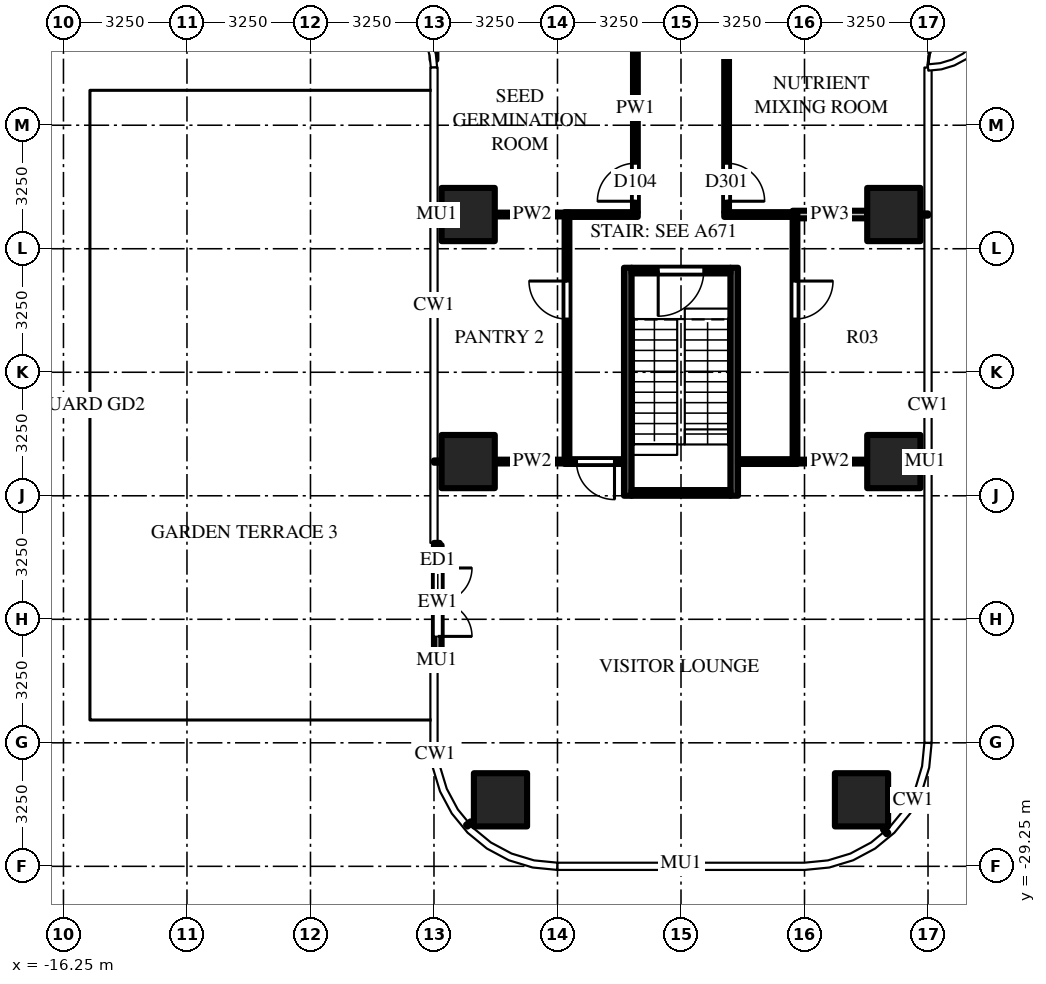
"""IFC4 building model, lengths in metres.
Left out: names, types, materials, properties, quantities, classifications, styles, units other than length and angle.
Written with IfcOpenShell. Run it as: python <this file> out.ifc"""

import sys

from ifc_helpers import new_model, si_unit, direction, frame, frame_2d, origin, origin_2d, place, context, subcontext, project, spatial, rectangle, extrude, source, transform, mapped, element, fill, save


model = new_model("IFC4")
c1 = context("Model", 3, precision=1e-05, world=origin(), true_north=direction((0.0, 1.0)))
c2 = subcontext(c1, "Body", "Model", "MODEL_VIEW")
j1 = project(units=[si_unit("LENGTHUNIT", "METRE"), si_unit("PLANEANGLEUNIT", "RADIAN")], contexts=[c1])
p1 = place(None, origin())
s1 = spatial("IfcSite", under=j1, at=p1, CompositionType="ELEMENT")
p2 = place(p1, origin())
s2 = spatial("IfcBuilding", under=s1, at=p2, CompositionType="ELEMENT")
p3 = place(p2, frame((0.0, 0.0, 34.0)))
s3 = spatial("IfcBuildingStorey", under=s2, at=p3, CompositionType="ELEMENT", Elevation=34.0)
m1 = source(origin(), c2, "Body", "SweptSolid", [
    extrude(rectangle(XDim=1.4, YDim=1.4, at=origin_2d()), origin(), (0.0, 0.0, 1.0), 4.5),
])
for number, where, z_axis, x_axis in (
    (1, (5.6, -12.1, 0.0), (0.0, 0.0, 1.0), (1.0, 0.0, 0.0)),
    (2, (5.6, -18.6, 0.0), (0.0, 0.0, 1.0), (1.0, 0.0, 0.0)),
    (3, (4.75, -27.5, 0.0), (0.0, 0.0, 1.0), (1.0, 0.0, 0.0)),
    (4, (-5.6, -12.1, 0.0), (0.0, 0.0, 1.0), (1.0, 0.0, 0.0)),
    (5, (-5.6, -18.6, 0.0), (0.0, 0.0, 1.0), (1.0, 0.0, 0.0)),
    (6, (-4.75, -27.5, 0.0), (0.0, 0.0, 1.0), (1.0, 0.0, 0.0)),
):
    element("IfcColumn", number, at=place(p3, frame(where, z_axis=z_axis, x_axis=x_axis)), inside=s3, PredefinedType="COLUMN", context=c2, shape_type="MappedRepresentation", body=[
        mapped(m1, transform((0.0, 0.0, 0.0))),
    ])
m2 = source(origin(), c2, "Body", "SweptSolid", [
    extrude(rectangle(XDim=6.0, YDim=0.2, at=frame_2d((3.0, 0.0))), origin(), (0.0, 0.0, 1.0), 4.25),
])
for number, where, z_axis, x_axis in (
    (7, (1.4, -13.5, 0.0), (0.0, 0.0, 1.0), (0.0, -1.0, 0.0)),
    (8, (-1.4, -13.5, 0.0), (0.0, 0.0, 1.0), (0.0, -1.0, 0.0)),
):
    element("IfcWall", number, at=place(p3, frame(where, z_axis=z_axis, x_axis=x_axis)), inside=s3, PredefinedType="SHEAR", context=c2, shape_type="MappedRepresentation", body=[
        mapped(m2, transform((0.0, 0.0, 0.0))),
    ])
m3 = source(origin(), c2, "Body", "SweptSolid", [
    extrude(rectangle(XDim=2.6, YDim=0.15, at=frame_2d((1.3, 0.0))), origin(), (0.0, 0.0, 1.0), 4.25),
])
p4 = place(p3, frame((1.3, -13.575, 0.0), z_axis=(0.0, 0.0, 1.0), x_axis=(-1.0, 0.0, 0.0)))
e9 = element("IfcWall", 9, at=p4, inside=s3, PredefinedType="SHEAR", context=c2, shape_type="MappedRepresentation", body=[
    mapped(m3, transform((0.0, 0.0, 0.0))),
])
m4 = source(origin(), c2, "Body", "SweptSolid", [
    extrude(rectangle(XDim=1.2, YDim=2.1, at=frame_2d((0.6, 1.05))), frame((0.0, 0.085, 0.0), z_axis=(0.0, -1.0, 0.0), x_axis=(1.0, 0.0, 0.0)), (0.0, 0.0, 1.0), 0.17),
])
p5 = place(p4, frame((0.7, 0.0, 0.0)))
e10 = element("IfcOpeningElement", 10, at=p5, cuts=e9, PredefinedType="OPENING", context=c2, shape_type="MappedRepresentation", body=[
    mapped(m4, transform((0.0, 0.0, 0.0))),
])
p6 = place(p3, frame((1.3, -19.425, 0.0), z_axis=(0.0, 0.0, 1.0), x_axis=(-1.0, 0.0, 0.0)))
e11 = element("IfcWall", 11, at=p6, inside=s3, PredefinedType="SHEAR", context=c2, shape_type="MappedRepresentation", body=[
    mapped(m3, transform((0.0, 0.0, 0.0))),
])
m5 = source(origin(), c2, "Body", "SweptSolid", [
    extrude(rectangle(XDim=3.0, YDim=0.2, at=frame_2d((1.5, 0.0))), origin(), (0.0, 0.0, 1.0), 4.25),
])
p7 = place(p3, frame((-6.4, -20.8, 0.0), z_axis=(0.0, 0.0, 1.0), x_axis=(0.0, -1.0, 0.0)))
e12 = element("IfcWall", 12, at=p7, inside=s3, PredefinedType="SOLIDWALL", context=c2, shape_type="MappedRepresentation", body=[
    mapped(m5, transform((0.0, 0.0, 0.0))),
])
m6 = source(origin(), c2, "Body", "SweptSolid", [
    extrude(rectangle(XDim=1.8, YDim=2.4, at=frame_2d((0.9, 1.2))), frame((0.0, 0.11, 0.0), z_axis=(0.0, -1.0, 0.0), x_axis=(1.0, 0.0, 0.0)), (0.0, 0.0, 1.0), 0.22),
])
p8 = place(p7, frame((0.6, 0.0, 0.0)))
e13 = element("IfcOpeningElement", 13, at=p8, cuts=e12, PredefinedType="OPENING", context=c2, shape_type="MappedRepresentation", body=[
    mapped(m6, transform((0.0, 0.0, 0.0))),
])
m7 = source(origin(), c2, "Body", "SweptSolid", [
    extrude(rectangle(XDim=1.469, YDim=0.125, at=frame_2d((0.734, 0.0))), origin(), (0.0, 0.0, 1.0), 4.25),
])
p9 = place(p3, frame((-6.5, -6.562, 0.0), z_axis=(0.0, 0.0, 1.0), x_axis=(0.0, -1.0, 0.0)))
e14 = element("IfcWall", 14, at=p9, inside=s3, PredefinedType="PARTITIONING", context=c2, shape_type="MappedRepresentation", body=[
    mapped(m7, transform((0.0, 0.0, 0.0))),
])
m8 = source(origin(), c2, "Body", "SweptSolid", [
    extrude(rectangle(XDim=6.4, YDim=0.125, at=frame_2d((3.2, 0.0))), origin(), (0.0, 0.0, 1.0), 3.468),
])
p10 = place(p3, frame((-3.0, -18.55, 0.0), z_axis=(0.0, 0.0, 1.0), x_axis=(0.0, 1.0, 0.0)))
e15 = element("IfcWall", 15, at=p10, inside=s3, PredefinedType="PARTITIONING", context=c2, shape_type="MappedRepresentation", body=[
    mapped(m8, transform((0.0, 0.0, 0.0))),
])
m9 = source(origin(), c2, "Body", "SweptSolid", [
    extrude(rectangle(XDim=1.0, YDim=2.1, at=frame_2d((0.5, 1.05))), frame((0.0, 0.073, 0.0), z_axis=(0.0, -1.0, 0.0), x_axis=(1.0, 0.0, 0.0)), (0.0, 0.0, 1.0), 0.145),
])
p11 = place(p10, frame((3.7, 0.0, 0.0)))
e16 = element("IfcOpeningElement", 16, at=p11, cuts=e15, PredefinedType="OPENING", context=c2, shape_type="MappedRepresentation", body=[
    mapped(m9, transform((0.0, 0.0, 0.0))),
])
m10 = source(origin(), c2, "Body", "SweptSolid", [
    extrude(rectangle(XDim=5.475, YDim=0.125, at=frame_2d((2.738, 0.0))), origin(), (0.0, 0.0, 1.0), 3.468),
])
p12 = place(p3, frame((-1.2, -12.038, 0.0), z_axis=(0.0, 0.0, 1.0), x_axis=(0.0, 1.0, 0.0)))
e17 = element("IfcWall", 17, at=p12, inside=s3, PredefinedType="PARTITIONING", context=c2, shape_type="MappedRepresentation", body=[
    mapped(m10, transform((0.0, 0.0, 0.0))),
])
p13 = place(p12, frame((0.288, 0.0, 0.0)))
e18 = element("IfcOpeningElement", 18, at=p13, cuts=e17, PredefinedType="OPENING", context=c2, shape_type="MappedRepresentation", body=[
    mapped(m9, transform((0.0, 0.0, 0.0))),
])
m11 = source(origin(), c2, "Body", "SweptSolid", [
    extrude(rectangle(XDim=8.725, YDim=0.125, at=frame_2d((4.363, 0.0))), origin(), (0.0, 0.0, 1.0), 3.468),
])
p14 = place(p3, frame((1.2, -3.312, 0.0), z_axis=(0.0, 0.0, 1.0), x_axis=(0.0, -1.0, 0.0)))
e19 = element("IfcWall", 19, at=p14, inside=s3, PredefinedType="PARTITIONING", context=c2, shape_type="MappedRepresentation", body=[
    mapped(m11, transform((0.0, 0.0, 0.0))),
])
p15 = place(p14, frame((7.438, 0.0, 0.0)))
e20 = element("IfcOpeningElement", 20, at=p15, cuts=e19, PredefinedType="OPENING", context=c2, shape_type="MappedRepresentation", body=[
    mapped(m9, transform((0.0, 0.0, 0.0))),
])
m12 = source(origin(), c2, "Body", "SweptSolid", [
    extrude(rectangle(XDim=6.35, YDim=0.125, at=frame_2d((3.175, 0.0))), origin(), (0.0, 0.0, 1.0), 3.468),
])
p16 = place(p3, frame((3.0, -12.2, 0.0), z_axis=(0.0, 0.0, 1.0), x_axis=(0.0, -1.0, 0.0)))
e21 = element("IfcWall", 21, at=p16, inside=s3, PredefinedType="PARTITIONING", context=c2, shape_type="MappedRepresentation", body=[
    mapped(m12, transform((0.0, 0.0, 0.0))),
])
p17 = place(p16, frame((1.65, 0.0, 0.0)))
e22 = element("IfcOpeningElement", 22, at=p17, cuts=e21, PredefinedType="OPENING", context=c2, shape_type="MappedRepresentation", body=[
    mapped(m9, transform((0.0, 0.0, 0.0))),
])
m13 = source(origin(), c2, "Body", "SweptSolid", [
    extrude(rectangle(XDim=1.962, YDim=0.1, at=frame_2d((0.981, 0.0))), origin(), (0.0, 0.0, 1.0), 3.697),
])
for number, where, z_axis, x_axis in (
    (23, (-4.9, -18.6, 0.0), (0.0, 0.0, 1.0), (1.0, 0.0, 0.0)),
    (24, (2.938, -18.6, 0.0), (0.0, 0.0, 1.0), (1.0, 0.0, 0.0)),
):
    element("IfcWall", number, at=place(p3, frame(where, z_axis=z_axis, x_axis=x_axis)), inside=s3, PredefinedType="PARTITIONING", context=c2, shape_type="MappedRepresentation", body=[
        mapped(m13, transform((0.0, 0.0, 0.0))),
    ])
m14 = source(origin(), c2, "Body", "SweptSolid", [
    extrude(rectangle(XDim=1.562, YDim=0.125, at=frame_2d((0.781, 0.0))), origin(), (0.0, 0.0, 1.0), 3.697),
])
p18 = place(p3, frame((-1.5, -18.6, 0.0), z_axis=(0.0, 0.0, 1.0), x_axis=(-1.0, 0.0, 0.0)))
e25 = element("IfcWall", 25, at=p18, inside=s3, PredefinedType="PARTITIONING", context=c2, shape_type="MappedRepresentation", body=[
    mapped(m14, transform((0.0, 0.0, 0.0))),
])
p19 = place(p18, frame((0.25, 0.0, 0.0)))
e26 = element("IfcOpeningElement", 26, at=p19, cuts=e25, PredefinedType="OPENING", context=c2, shape_type="MappedRepresentation", body=[
    mapped(m9, transform((0.0, 0.0, 0.0))),
])
p20 = place(p3, frame((3.062, -18.6, 0.0), z_axis=(0.0, 0.0, 1.0), x_axis=(-1.0, 0.0, 0.0)))
e27 = element("IfcWall", 27, at=p20, inside=s3, PredefinedType="PARTITIONING", context=c2, shape_type="MappedRepresentation", body=[
    mapped(m14, transform((0.0, 0.0, 0.0))),
])
m15 = source(origin(), c2, "Body", "SweptSolid", [
    extrude(rectangle(XDim=1.962, YDim=0.2, at=frame_2d((0.981, 0.0))), origin(), (0.0, 0.0, 1.0), 3.468),
])
p21 = place(p3, frame((2.938, -12.1, 0.0), z_axis=(0.0, 0.0, 1.0), x_axis=(1.0, 0.0, 0.0)))
e28 = element("IfcWall", 28, at=p21, inside=s3, PredefinedType="PARTITIONING", context=c2, shape_type="MappedRepresentation", body=[
    mapped(m15, transform((0.0, 0.0, 0.0))),
])
m16 = source(origin(), c2, "Body", "SweptSolid", [
    extrude(rectangle(XDim=1.962, YDim=0.1, at=frame_2d((0.981, 0.0))), origin(), (0.0, 0.0, 1.0), 3.468),
])
p22 = place(p3, frame((-4.9, -12.1, 0.0), z_axis=(0.0, 0.0, 1.0), x_axis=(1.0, 0.0, 0.0)))
e29 = element("IfcWall", 29, at=p22, inside=s3, PredefinedType="PARTITIONING", context=c2, shape_type="MappedRepresentation", body=[
    mapped(m16, transform((0.0, 0.0, 0.0))),
])
m17 = source(origin(), c2, "Body", "SweptSolid", [
    extrude(rectangle(XDim=1.925, YDim=0.125, at=frame_2d((0.962, 0.0))), origin(), (0.0, 0.0, 1.0), 3.468),
])
for number, where, z_axis, x_axis in (
    (30, (-3.062, -12.1, 0.0), (0.0, 0.0, 1.0), (1.0, 0.0, 0.0)),
    (31, (1.137, -12.1, 0.0), (0.0, 0.0, 1.0), (1.0, 0.0, 0.0)),
):
    element("IfcWall", number, at=place(p3, frame(where, z_axis=z_axis, x_axis=x_axis)), inside=s3, PredefinedType="PARTITIONING", context=c2, shape_type="MappedRepresentation", body=[
        mapped(m17, transform((0.0, 0.0, 0.0))),
    ])
m18 = source(origin(), c2, "Body", "SweptSolid", [
    extrude(rectangle(XDim=1.2, YDim=2.1, at=frame_2d((0.6, 1.05))), frame((0.0, 0.025, 0.0), z_axis=(0.0, -1.0, 0.0), x_axis=(1.0, 0.0, 0.0)), (0.0, 0.0, 1.0), 0.05),
])
p23 = place(p5, origin())
e32 = element("IfcDoor", 32, at=p23, inside=s3, OperationType="SINGLE_SWING_RIGHT", PredefinedType="DOOR", context=c2, shape_type="MappedRepresentation", body=[
    mapped(m18, transform((0.0, 0.0, 0.0))),
])
fill(e10, e32)
m19 = source(origin(), c2, "Body", "SweptSolid", [
    extrude(rectangle(XDim=1.8, YDim=2.4, at=frame_2d((0.9, 1.2))), frame((0.0, 0.025, 0.0), z_axis=(0.0, -1.0, 0.0), x_axis=(1.0, 0.0, 0.0)), (0.0, 0.0, 1.0), 0.05),
])
p24 = place(p8, origin())
e33 = element("IfcDoor", 33, at=p24, inside=s3, OperationType="DOUBLE_DOOR_SINGLE_SWING", PredefinedType="DOOR", context=c2, shape_type="MappedRepresentation", body=[
    mapped(m19, transform((0.0, 0.0, 0.0))),
])
fill(e13, e33)
m20 = source(origin(), c2, "Body", "SweptSolid", [
    extrude(rectangle(XDim=1.0, YDim=2.1, at=frame_2d((0.5, 1.05))), frame((0.0, 0.025, 0.0), z_axis=(0.0, -1.0, 0.0), x_axis=(1.0, 0.0, 0.0)), (0.0, 0.0, 1.0), 0.05),
])
p25 = place(p19, origin())
e34 = element("IfcDoor", 34, at=p25, inside=s3, OperationType="SINGLE_SWING_LEFT", PredefinedType="DOOR", context=c2, shape_type="MappedRepresentation", body=[
    mapped(m20, transform((0.0, 0.0, 0.0))),
])
fill(e26, e34)
p26 = place(p11, origin())
e35 = element("IfcDoor", 35, at=p26, inside=s3, OperationType="SINGLE_SWING_RIGHT", PredefinedType="DOOR", context=c2, shape_type="MappedRepresentation", body=[
    mapped(m20, transform((0.0, 0.0, 0.0))),
])
fill(e16, e35)
p27 = place(p17, origin())
e36 = element("IfcDoor", 36, at=p27, inside=s3, OperationType="SINGLE_SWING_LEFT", PredefinedType="DOOR", context=c2, shape_type="MappedRepresentation", body=[
    mapped(m20, transform((0.0, 0.0, 0.0))),
])
fill(e22, e36)
p28 = place(p13, origin())
e37 = element("IfcDoor", 37, at=p28, inside=s3, OperationType="SINGLE_SWING_LEFT", PredefinedType="DOOR", context=c2, shape_type="MappedRepresentation", body=[
    mapped(m20, transform((0.0, 0.0, 0.0))),
])
fill(e18, e37)
p29 = place(p15, origin())
e38 = element("IfcDoor", 38, at=p29, inside=s3, OperationType="SINGLE_SWING_RIGHT", PredefinedType="DOOR", context=c2, shape_type="MappedRepresentation", body=[
    mapped(m20, transform((0.0, 0.0, 0.0))),
])
fill(e20, e38)
save(model, sys.argv[1])
